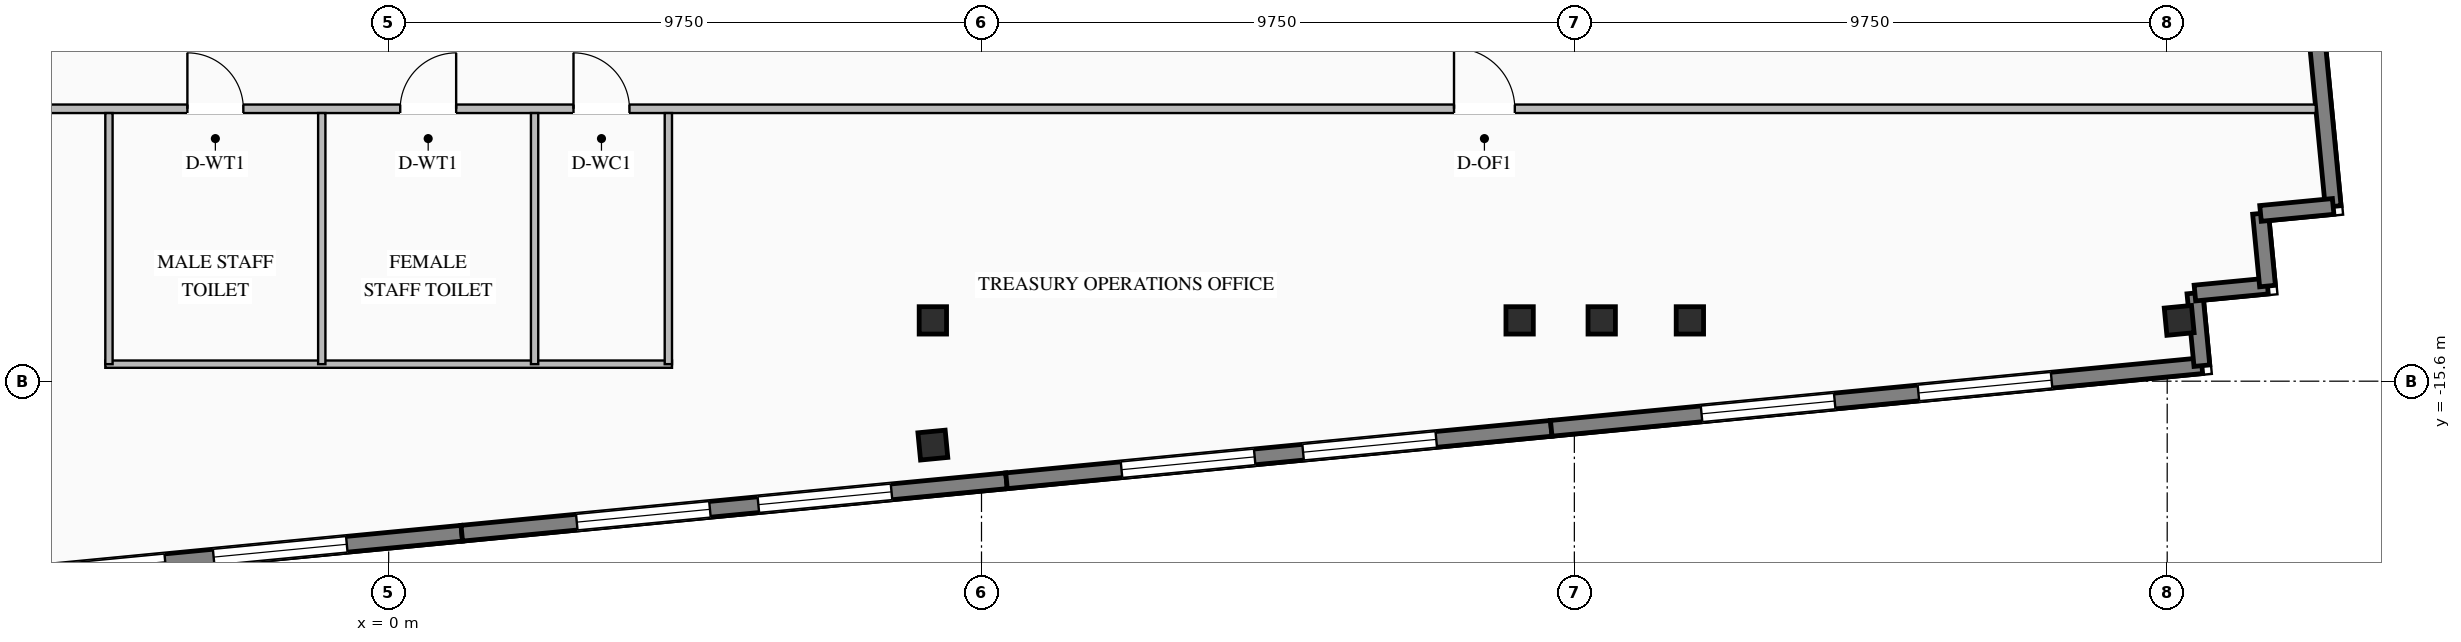
"""IFC4 building model, lengths in metres.
Left out: names, types, materials, properties, quantities, classifications, styles, units other than length and angle.
Written with IfcOpenShell. Run it as: python <this file> out.ifc"""

import sys

from ifc_helpers import new_model, si_unit, direction, frame, frame_2d, origin, origin_2d, place, context, subcontext, project, spatial, rectangle, i_section, extrude, element, fill, save


model = new_model("IFC4")
c1 = context("Model", 3, precision=1e-05, world=origin(), true_north=direction((0.0, 1.0)))
c2 = subcontext(c1, "Body", "Model", "MODEL_VIEW")
j1 = project(units=[si_unit("LENGTHUNIT", "METRE"), si_unit("PLANEANGLEUNIT", "RADIAN")], contexts=[c1])
p1 = place(None, origin())
s1 = spatial("IfcSite", under=j1, at=p1, CompositionType="ELEMENT")
p2 = place(p1, origin())
s2 = spatial("IfcBuilding", under=s1, at=p2, CompositionType="ELEMENT")
p3 = place(p2, frame((0.0, 0.0, 247.5)))
s3 = spatial("IfcBuildingStorey", under=s2, at=p3, CompositionType="ELEMENT", Elevation=247.5)
for number, where, z_axis, x_axis in (
    (1, (8.95, -14.6, 0.0), (0.0, 0.0, 1.0), (1.0, 0.0, 0.0)),
    (2, (18.6, -14.6, 0.0), (0.0, 0.0, 1.0), (1.0, 0.0, 0.0)),
    (3, (19.95, -14.6, 0.0), (0.0, 0.0, 1.0), (1.0, 0.0, 0.0)),
    (4, (21.4, -14.6, 0.0), (0.0, 0.0, 1.0), (1.0, 0.0, 0.0)),
):
    element("IfcColumn", number, at=place(p3, frame(where, z_axis=z_axis, x_axis=x_axis)), inside=s3, PredefinedType="COLUMN", context=c2, shape_type="SweptSolid", body=[
        extrude(i_section(OverallWidth=0.45, OverallDepth=0.45, WebThickness=0.022, FlangeThickness=0.032, at=origin_2d()), origin(), (0.0, 0.0, 1.0), 4.2),
    ])
for number, where, z_axis, x_axis in (
    (5, (8.95, -16.651, -0.28), (0.0, 0.0, 1.0), (0.995, 0.096, 0.0)),
    (6, (29.447, -14.6, -0.28), (0.0, 0.0, 1.0), (0.995, 0.096, 0.0)),
):
    element("IfcColumn", number, at=place(p3, frame(where, z_axis=z_axis, x_axis=x_axis)), inside=s3, PredefinedType="COLUMN", context=c2, shape_type="SweptSolid", body=[
        extrude(i_section(OverallWidth=0.45, OverallDepth=0.45, WebThickness=0.022, FlangeThickness=0.032, at=origin_2d()), origin(), (0.0, 0.0, 1.0), 4.48),
    ])
p4 = place(p3, frame((1.203, -18.101, 0.0), z_axis=(0.0, 0.0, 1.0), x_axis=(-0.995397043619, -0.095836973841, 0.0)))
e7 = element("IfcWall", 7, at=p4, inside=s3, PredefinedType="STANDARD", context=c2, shape_type="SweptSolid", body=[
    extrude(rectangle(XDim=9.0, YDim=0.26, at=frame_2d((4.5, 0.0))), origin(), (0.0, 0.0, 1.0), 4.0),
])
p5 = place(p4, frame((1.9, 0.0, 0.76)))
e8 = element("IfcOpeningElement", 8, at=p5, cuts=e7, PredefinedType="OPENING", context=c2, shape_type="SweptSolid", body=[
    extrude(rectangle(XDim=2.2, YDim=2.25, at=frame_2d((1.1, 1.125))), frame((0.0, 0.14, 0.0), z_axis=(0.0, -1.0, 0.0), x_axis=(1.0, 0.0, 0.0)), (0.0, 0.0, 1.0), 0.28),
])
p6 = place(p4, frame((4.9, 0.0, 0.76)))
e9 = element("IfcOpeningElement", 9, at=p6, cuts=e7, PredefinedType="OPENING", context=c2, shape_type="SweptSolid", body=[
    extrude(rectangle(XDim=2.2, YDim=2.25, at=frame_2d((1.1, 1.125))), frame((0.0, 0.14, 0.0), z_axis=(0.0, -1.0, 0.0), x_axis=(1.0, 0.0, 0.0)), (0.0, 0.0, 1.0), 0.28),
])
p7 = place(p3, frame((10.161, -17.238, 0.0), z_axis=(0.0, 0.0, 1.0), x_axis=(-0.995394206237, -0.095866439332, 0.0)))
e10 = element("IfcWall", 10, at=p7, inside=s3, PredefinedType="STANDARD", context=c2, shape_type="SweptSolid", body=[
    extrude(rectangle(XDim=9.0, YDim=0.26, at=frame_2d((4.5, 0.0))), origin(), (0.0, 0.0, 1.0), 4.0),
])
p8 = place(p7, frame((1.9, 0.0, 0.76)))
e11 = element("IfcOpeningElement", 11, at=p8, cuts=e10, PredefinedType="OPENING", context=c2, shape_type="SweptSolid", body=[
    extrude(rectangle(XDim=2.2, YDim=2.25, at=frame_2d((1.1, 1.125))), frame((0.0, 0.14, 0.0), z_axis=(0.0, -1.0, 0.0), x_axis=(1.0, 0.0, 0.0)), (0.0, 0.0, 1.0), 0.28),
])
p9 = place(p7, frame((4.9, 0.0, 0.76)))
e12 = element("IfcOpeningElement", 12, at=p9, cuts=e10, PredefinedType="OPENING", context=c2, shape_type="SweptSolid", body=[
    extrude(rectangle(XDim=2.2, YDim=2.25, at=frame_2d((1.1, 1.125))), frame((0.0, 0.14, 0.0), z_axis=(0.0, -1.0, 0.0), x_axis=(1.0, 0.0, 0.0)), (0.0, 0.0, 1.0), 0.28),
])
p10 = place(p3, frame((19.12, -16.375, 0.0), z_axis=(0.0, 0.0, 1.0), x_axis=(-0.995396794462, -0.09583956164, 0.0)))
e13 = element("IfcWall", 13, at=p10, inside=s3, PredefinedType="STANDARD", context=c2, shape_type="SweptSolid", body=[
    extrude(rectangle(XDim=9.0, YDim=0.26, at=frame_2d((4.5, 0.0))), origin(), (0.0, 0.0, 1.0), 4.0),
])
p11 = place(p10, frame((1.9, 0.0, 0.76)))
e14 = element("IfcOpeningElement", 14, at=p11, cuts=e13, PredefinedType="OPENING", context=c2, shape_type="SweptSolid", body=[
    extrude(rectangle(XDim=2.2, YDim=2.25, at=frame_2d((1.1, 1.125))), frame((0.0, 0.14, 0.0), z_axis=(0.0, -1.0, 0.0), x_axis=(1.0, 0.0, 0.0)), (0.0, 0.0, 1.0), 0.28),
])
p12 = place(p10, frame((4.9, 0.0, 0.76)))
e15 = element("IfcOpeningElement", 15, at=p12, cuts=e13, PredefinedType="OPENING", context=c2, shape_type="SweptSolid", body=[
    extrude(rectangle(XDim=2.2, YDim=2.25, at=frame_2d((1.1, 1.125))), frame((0.0, 0.14, 0.0), z_axis=(0.0, -1.0, 0.0), x_axis=(1.0, 0.0, 0.0)), (0.0, 0.0, 1.0), 0.28),
])
p13 = place(p3, frame((29.821, -15.345, 0.0), z_axis=(0.0, 0.0, 1.0), x_axis=(-0.995396954468, -0.095837899791, 0.0)))
e16 = element("IfcWall", 16, at=p13, inside=s3, PredefinedType="STANDARD", context=c2, shape_type="SweptSolid", body=[
    extrude(rectangle(XDim=10.75, YDim=0.26, at=frame_2d((5.375, 0.0))), origin(), (0.0, 0.0, 1.0), 4.0),
])
p14 = place(p13, frame((2.483, 0.0, 0.76)))
e17 = element("IfcOpeningElement", 17, at=p14, cuts=e16, PredefinedType="OPENING", context=c2, shape_type="SweptSolid", body=[
    extrude(rectangle(XDim=2.2, YDim=2.25, at=frame_2d((1.1, 1.125))), frame((0.0, 0.14, 0.0), z_axis=(0.0, -1.0, 0.0), x_axis=(1.0, 0.0, 0.0)), (0.0, 0.0, 1.0), 0.28),
])
p15 = place(p13, frame((6.067, 0.0, 0.76)))
e18 = element("IfcOpeningElement", 18, at=p15, cuts=e16, PredefinedType="OPENING", context=c2, shape_type="SweptSolid", body=[
    extrude(rectangle(XDim=2.2, YDim=2.25, at=frame_2d((1.1, 1.125))), frame((0.0, 0.14, 0.0), z_axis=(0.0, -1.0, 0.0), x_axis=(1.0, 0.0, 0.0)), (0.0, 0.0, 1.0), 0.28),
])
p16 = place(p3, frame((30.527, 2.354, 0.0), z_axis=(0.0, 0.0, 1.0), x_axis=(0.095850890337, -0.995395703638, 0.0)))
e19 = element("IfcWall", 19, at=p16, inside=s3, PredefinedType="STANDARD", context=c2, shape_type="SweptSolid", body=[
    extrude(rectangle(XDim=15.15, YDim=0.26, at=frame_2d((7.575, 0.0))), origin(), (0.0, 0.0, 1.0), 4.0),
])
p17 = place(p16, frame((4.05, 0.0, 0.76)))
e20 = element("IfcOpeningElement", 20, at=p17, cuts=e19, PredefinedType="OPENING", context=c2, shape_type="SweptSolid", body=[
    extrude(rectangle(XDim=2.0, YDim=2.05, at=frame_2d((1.0, 1.025))), frame((0.0, 0.14, 0.0), z_axis=(0.0, -1.0, 0.0), x_axis=(1.0, 0.0, 0.0)), (0.0, 0.0, 1.0), 0.28),
])
p18 = place(p16, frame((9.1, 0.0, 0.76)))
e21 = element("IfcOpeningElement", 21, at=p18, cuts=e19, PredefinedType="OPENING", context=c2, shape_type="SweptSolid", body=[
    extrude(rectangle(XDim=2.0, YDim=2.05, at=frame_2d((1.0, 1.025))), frame((0.0, 0.14, 0.0), z_axis=(0.0, -1.0, 0.0), x_axis=(1.0, 0.0, 0.0)), (0.0, 0.0, 1.0), 0.28),
])
for number, where, z_axis, x_axis in (
    (22, (29.821, -15.345, 0.0), (0.0, 0.0, 1.0), (-0.096, 0.995, 0.0)),
    (23, (29.705, -14.15, 0.0), (0.0, 0.0, 1.0), (0.995, 0.096, 0.0)),
):
    element("IfcWall", number, at=place(p3, frame(where, z_axis=z_axis, x_axis=x_axis)), inside=s3, PredefinedType="STANDARD", context=c2, shape_type="SweptSolid", body=[
        extrude(rectangle(XDim=1.2, YDim=0.26, at=frame_2d((0.6, 0.0))), origin(), (0.0, 0.0, 1.0), 2.195),
    ])
p19 = place(p3, frame((30.9, -14.035, 0.0), z_axis=(0.0, 0.0, 1.0), x_axis=(-0.095836473879, 0.995397091755, 0.0)))
e24 = element("IfcWall", 24, at=p19, inside=s3, PredefinedType="STANDARD", context=c2, shape_type="SweptSolid", body=[
    extrude(rectangle(XDim=1.2, YDim=0.26, at=frame_2d((0.6, 0.0))), origin(), (0.0, 0.0, 1.0), 2.195),
])
p20 = place(p3, frame((30.785, -12.841, 0.0), z_axis=(0.0, 0.0, 1.0), x_axis=(0.995398960025, 0.095817067274, 0.0)))
e25 = element("IfcWall", 25, at=p20, inside=s3, PredefinedType="STANDARD", context=c2, shape_type="SweptSolid", body=[
    extrude(rectangle(XDim=1.2, YDim=0.26, at=frame_2d((0.6, 0.0))), origin(), (0.0, 0.0, 1.0), 2.195),
])
p21 = place(p3, frame((-21.591, -11.12, 0.0), z_axis=(0.0, 0.0, 1.0), x_axis=(1.0, 0.0, 0.0)))
e26 = element("IfcWall", 26, at=p21, inside=s3, PredefinedType="STANDARD", context=c2, shape_type="SweptSolid", body=[
    extrude(rectangle(XDim=53.285, YDim=0.14, at=frame_2d((26.643, 0.0))), origin(), (0.0, 0.0, 1.0), 4.0),
])
p22 = place(p21, frame((18.281, 0.0, 0.0)))
e27 = element("IfcOpeningElement", 27, at=p22, cuts=e26, PredefinedType="OPENING", context=c2, shape_type="SweptSolid", body=[
    extrude(rectangle(XDim=0.92, YDim=2.08, at=frame_2d((0.46, 1.04))), frame((0.0, 0.08, 0.0), z_axis=(0.0, -1.0, 0.0), x_axis=(1.0, 0.0, 0.0)), (0.0, 0.0, 1.0), 0.16),
])
p23 = place(p21, frame((21.781, 0.0, 0.0)))
e28 = element("IfcOpeningElement", 28, at=p23, cuts=e26, PredefinedType="OPENING", context=c2, shape_type="SweptSolid", body=[
    extrude(rectangle(XDim=0.92, YDim=2.08, at=frame_2d((0.46, 1.04))), frame((0.0, 0.08, 0.0), z_axis=(0.0, -1.0, 0.0), x_axis=(1.0, 0.0, 0.0)), (0.0, 0.0, 1.0), 0.16),
])
p24 = place(p21, frame((24.631, 0.0, 0.0)))
e29 = element("IfcOpeningElement", 29, at=p24, cuts=e26, PredefinedType="OPENING", context=c2, shape_type="SweptSolid", body=[
    extrude(rectangle(XDim=0.92, YDim=2.08, at=frame_2d((0.46, 1.04))), frame((0.0, 0.08, 0.0), z_axis=(0.0, -1.0, 0.0), x_axis=(1.0, 0.0, 0.0)), (0.0, 0.0, 1.0), 0.16),
])
p25 = place(p21, frame((8.122, 0.0, 0.0)))
e30 = element("IfcOpeningElement", 30, at=p25, cuts=e26, PredefinedType="OPENING", context=c2, shape_type="SweptSolid", body=[
    extrude(rectangle(XDim=1.0, YDim=2.08, at=frame_2d((0.5, 1.04))), frame((0.0, 0.08, 0.0), z_axis=(0.0, -1.0, 0.0), x_axis=(1.0, 0.0, 0.0)), (0.0, 0.0, 1.0), 0.16),
])
p26 = place(p21, frame((39.112, 0.0, 0.0)))
e31 = element("IfcOpeningElement", 31, at=p26, cuts=e26, PredefinedType="OPENING", context=c2, shape_type="SweptSolid", body=[
    extrude(rectangle(XDim=1.0, YDim=2.08, at=frame_2d((0.5, 1.04))), frame((0.0, 0.08, 0.0), z_axis=(0.0, -1.0, 0.0), x_axis=(1.0, 0.0, 0.0)), (0.0, 0.0, 1.0), 0.16),
])
p27 = place(p3, frame((-4.66, -15.32, 0.0), z_axis=(0.0, 0.0, 1.0), x_axis=(1.0, 0.0, 0.0)))
e32 = element("IfcWall", 32, at=p27, inside=s3, PredefinedType="STANDARD", context=c2, shape_type="SweptSolid", body=[
    extrude(rectangle(XDim=9.32, YDim=0.12, at=frame_2d((4.66, 0.0))), origin(), (0.0, 0.0, 1.0), 4.0),
])
for number, where, z_axis, x_axis in (
    (33, (-4.6, -15.32, 0.0), (0.0, 0.0, 1.0), (0.0, 1.0, 0.0)),
    (34, (-1.1, -15.32, 0.0), (0.0, 0.0, 1.0), (0.0, 1.0, 0.0)),
    (35, (2.4, -15.32, 0.0), (0.0, 0.0, 1.0), (0.0, 1.0, 0.0)),
    (36, (4.6, -15.32, 0.0), (0.0, 0.0, 1.0), (0.0, 1.0, 0.0)),
):
    element("IfcWall", number, at=place(p3, frame(where, z_axis=z_axis, x_axis=x_axis)), inside=s3, PredefinedType="STANDARD", context=c2, shape_type="SweptSolid", body=[
        extrude(rectangle(XDim=4.13, YDim=0.12, at=frame_2d((2.065, 0.0))), origin(), (0.0, 0.0, 1.0), 4.0),
    ])
p28 = place(p5, origin())
e37 = element("IfcWindow", 37, at=p28, inside=s3, PartitioningType="DOUBLE_PANEL_VERTICAL", PredefinedType="WINDOW", context=c2, shape_type="SweptSolid", body=[
    extrude(rectangle(XDim=2.2, YDim=2.25, at=frame_2d((1.1, 1.125))), frame((0.0, 0.03, 0.0), z_axis=(0.0, -1.0, 0.0), x_axis=(1.0, 0.0, 0.0)), (0.0, 0.0, 1.0), 0.06),
])
fill(e8, e37)
p29 = place(p6, origin())
e38 = element("IfcWindow", 38, at=p29, inside=s3, PartitioningType="DOUBLE_PANEL_VERTICAL", PredefinedType="WINDOW", context=c2, shape_type="SweptSolid", body=[
    extrude(rectangle(XDim=2.2, YDim=2.25, at=frame_2d((1.1, 1.125))), frame((0.0, 0.03, 0.0), z_axis=(0.0, -1.0, 0.0), x_axis=(1.0, 0.0, 0.0)), (0.0, 0.0, 1.0), 0.06),
])
fill(e9, e38)
p30 = place(p8, origin())
e39 = element("IfcWindow", 39, at=p30, inside=s3, PartitioningType="DOUBLE_PANEL_VERTICAL", PredefinedType="WINDOW", context=c2, shape_type="SweptSolid", body=[
    extrude(rectangle(XDim=2.2, YDim=2.25, at=frame_2d((1.1, 1.125))), frame((0.0, 0.03, 0.0), z_axis=(0.0, -1.0, 0.0), x_axis=(1.0, 0.0, 0.0)), (0.0, 0.0, 1.0), 0.06),
])
fill(e11, e39)
p31 = place(p9, origin())
e40 = element("IfcWindow", 40, at=p31, inside=s3, PartitioningType="DOUBLE_PANEL_VERTICAL", PredefinedType="WINDOW", context=c2, shape_type="SweptSolid", body=[
    extrude(rectangle(XDim=2.2, YDim=2.25, at=frame_2d((1.1, 1.125))), frame((0.0, 0.03, 0.0), z_axis=(0.0, -1.0, 0.0), x_axis=(1.0, 0.0, 0.0)), (0.0, 0.0, 1.0), 0.06),
])
fill(e12, e40)
p32 = place(p11, origin())
e41 = element("IfcWindow", 41, at=p32, inside=s3, PartitioningType="DOUBLE_PANEL_VERTICAL", PredefinedType="WINDOW", context=c2, shape_type="SweptSolid", body=[
    extrude(rectangle(XDim=2.2, YDim=2.25, at=frame_2d((1.1, 1.125))), frame((0.0, 0.03, 0.0), z_axis=(0.0, -1.0, 0.0), x_axis=(1.0, 0.0, 0.0)), (0.0, 0.0, 1.0), 0.06),
])
fill(e14, e41)
p33 = place(p12, origin())
e42 = element("IfcWindow", 42, at=p33, inside=s3, PartitioningType="DOUBLE_PANEL_VERTICAL", PredefinedType="WINDOW", context=c2, shape_type="SweptSolid", body=[
    extrude(rectangle(XDim=2.2, YDim=2.25, at=frame_2d((1.1, 1.125))), frame((0.0, 0.03, 0.0), z_axis=(0.0, -1.0, 0.0), x_axis=(1.0, 0.0, 0.0)), (0.0, 0.0, 1.0), 0.06),
])
fill(e15, e42)
p34 = place(p14, origin())
e43 = element("IfcWindow", 43, at=p34, inside=s3, PartitioningType="DOUBLE_PANEL_VERTICAL", PredefinedType="WINDOW", context=c2, shape_type="SweptSolid", body=[
    extrude(rectangle(XDim=2.2, YDim=2.25, at=frame_2d((1.1, 1.125))), frame((0.0, 0.03, 0.0), z_axis=(0.0, -1.0, 0.0), x_axis=(1.0, 0.0, 0.0)), (0.0, 0.0, 1.0), 0.06),
])
fill(e17, e43)
p35 = place(p15, origin())
e44 = element("IfcWindow", 44, at=p35, inside=s3, PartitioningType="DOUBLE_PANEL_VERTICAL", PredefinedType="WINDOW", context=c2, shape_type="SweptSolid", body=[
    extrude(rectangle(XDim=2.2, YDim=2.25, at=frame_2d((1.1, 1.125))), frame((0.0, 0.03, 0.0), z_axis=(0.0, -1.0, 0.0), x_axis=(1.0, 0.0, 0.0)), (0.0, 0.0, 1.0), 0.06),
])
fill(e18, e44)
p36 = place(p22, origin())
e45 = element("IfcDoor", 45, at=p36, inside=s3, OperationType="SINGLE_SWING_LEFT", PredefinedType="DOOR", context=c2, shape_type="SweptSolid", body=[
    extrude(rectangle(XDim=0.92, YDim=2.08, at=frame_2d((0.46, 1.04))), frame((0.0, 0.025, 0.0), z_axis=(0.0, -1.0, 0.0), x_axis=(1.0, 0.0, 0.0)), (0.0, 0.0, 1.0), 0.05),
])
fill(e27, e45)
p37 = place(p23, origin())
e46 = element("IfcDoor", 46, at=p37, inside=s3, OperationType="SINGLE_SWING_RIGHT", PredefinedType="DOOR", context=c2, shape_type="SweptSolid", body=[
    extrude(rectangle(XDim=0.92, YDim=2.08, at=frame_2d((0.46, 1.04))), frame((0.0, 0.025, 0.0), z_axis=(0.0, -1.0, 0.0), x_axis=(1.0, 0.0, 0.0)), (0.0, 0.0, 1.0), 0.05),
])
fill(e28, e46)
p38 = place(p24, origin())
e47 = element("IfcDoor", 47, at=p38, inside=s3, OperationType="SINGLE_SWING_LEFT", PredefinedType="DOOR", context=c2, shape_type="SweptSolid", body=[
    extrude(rectangle(XDim=0.92, YDim=2.08, at=frame_2d((0.46, 1.04))), frame((0.0, 0.025, 0.0), z_axis=(0.0, -1.0, 0.0), x_axis=(1.0, 0.0, 0.0)), (0.0, 0.0, 1.0), 0.05),
])
fill(e29, e47)
p39 = place(p26, origin())
e48 = element("IfcDoor", 48, at=p39, inside=s3, OperationType="SINGLE_SWING_LEFT", PredefinedType="DOOR", context=c2, shape_type="SweptSolid", body=[
    extrude(rectangle(XDim=1.0, YDim=2.08, at=frame_2d((0.5, 1.04))), frame((0.0, 0.025, 0.0), z_axis=(0.0, -1.0, 0.0), x_axis=(1.0, 0.0, 0.0)), (0.0, 0.0, 1.0), 0.05),
])
fill(e31, e48)
save(model, sys.argv[1])
